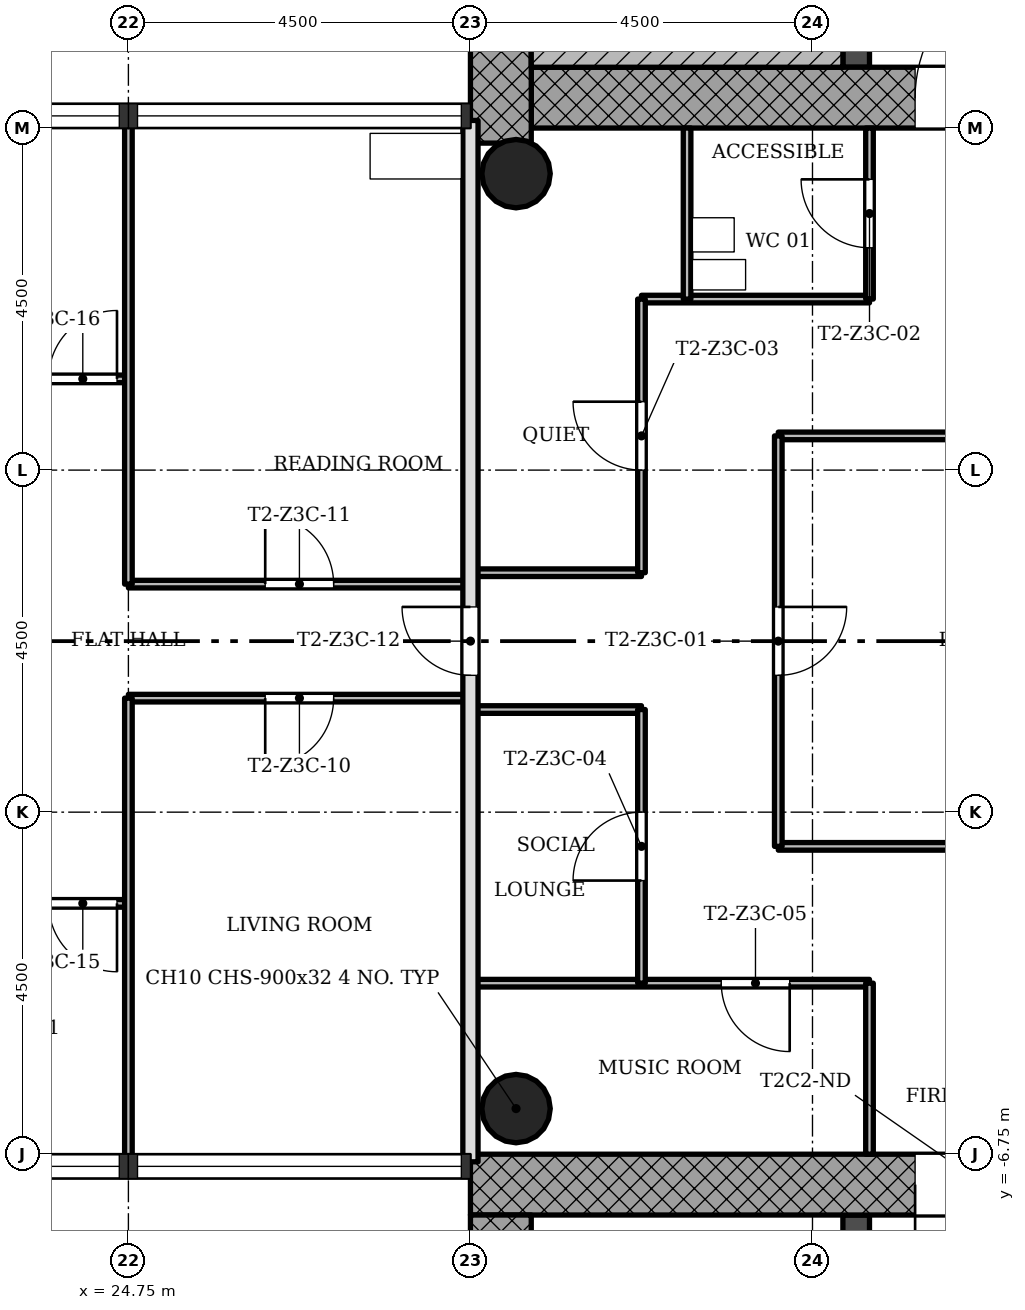
"""IFC4 building model, lengths in metres.
Left out: names, types, materials, properties, quantities, classifications, styles, units other than length and angle.
Written with IfcOpenShell. Run it as: python <this file> out.ifc"""

import sys

from ifc_helpers import new_model, si_unit, direction, frame, frame_2d, origin, origin_2d, place, context, subcontext, project, spatial, rectangle, hollow_circle, extrude, element, fill, save


model = new_model("IFC4")
c1 = context("Model", 3, precision=1e-05, world=origin(), true_north=direction((0.0, 1.0)))
c2 = subcontext(c1, "Body", "Model", "MODEL_VIEW")
j1 = project(units=[si_unit("LENGTHUNIT", "METRE"), si_unit("PLANEANGLEUNIT", "RADIAN")], contexts=[c1])
p1 = place(None, origin())
s1 = spatial("IfcSite", under=j1, at=p1, CompositionType="ELEMENT")
p2 = place(p1, origin())
s2 = spatial("IfcBuilding", under=s1, at=p2, CompositionType="ELEMENT")
p3 = place(p2, frame((0.0, 0.0, 160.9)))
s3 = spatial("IfcBuildingStorey", under=s2, at=p3, CompositionType="ELEMENT", Elevation=160.9)
p4 = place(p3, frame((30.05, 7.15, 0.0), z_axis=(0.0, 0.0, 1.0), x_axis=(1.0, 0.0, 0.0)))
e1 = element("IfcWall", 1, at=p4, inside=s3, PredefinedType="SHEAR", context=c2, shape_type="SweptSolid", body=[
    extrude(rectangle(XDim=12.7, YDim=0.8, at=frame_2d((6.35, 0.0))), origin(), (0.0, 0.0, 1.0), 3.4),
])
p5 = place(p4, frame((5.05, 0.0, 0.0)))
e2 = element("IfcOpeningElement", 2, at=p5, cuts=e1, PredefinedType="OPENING", context=c2, shape_type="SweptSolid", body=[
    extrude(rectangle(XDim=1.8, YDim=2.1, at=frame_2d((0.9, 1.05))), frame((0.0, 0.41, 0.0), z_axis=(0.0, -1.0, 0.0), x_axis=(1.0, 0.0, 0.0)), (0.0, 0.0, 1.0), 0.82),
])
p6 = place(p3, frame((29.65, 15.348, 0.0), z_axis=(0.0, 0.0, 1.0), x_axis=(0.0, -1.0, 0.0)))
e3 = element("IfcWall", 3, at=p6, inside=s3, PredefinedType="SHEAR", context=c2, shape_type="SweptSolid", body=[
    extrude(rectangle(XDim=8.796, YDim=0.8, at=frame_2d((4.398, 0.0))), origin(), (0.0, 0.0, 1.0), 3.4),
])
p7 = place(p3, frame((34.325, 7.55, 0.0), z_axis=(0.0, 0.0, 1.0), x_axis=(0.0, 1.0, 0.0)))
e4 = element("IfcWall", 4, at=p7, inside=s3, PredefinedType="SHEAR", context=c2, shape_type="SweptSolid", body=[
    extrude(rectangle(XDim=7.4, YDim=0.35, at=frame_2d((3.7, 0.0))), origin(), (0.0, 0.0, 1.0), 3.4),
])
p8 = place(p7, frame((0.85, 0.0, 0.0)))
e5 = element("IfcOpeningElement", 5, at=p8, cuts=e4, PredefinedType="OPENING", context=c2, shape_type="SweptSolid", body=[
    extrude(rectangle(XDim=0.9, YDim=2.1, at=frame_2d((0.45, 1.05))), frame((0.0, 0.185, 0.0), z_axis=(0.0, -1.0, 0.0), x_axis=(1.0, 0.0, 0.0)), (0.0, 0.0, 1.0), 0.37),
])
p9 = place(p3, frame((41.95, -7.15, 0.0), z_axis=(0.0, 0.0, 1.0), x_axis=(-1.0, 0.0, 0.0)))
e6 = element("IfcWall", 6, at=p9, inside=s3, PredefinedType="SHEAR", context=c2, shape_type="SweptSolid", body=[
    extrude(rectangle(XDim=12.7, YDim=0.8, at=frame_2d((6.35, 0.0))), origin(), (0.0, 0.0, 1.0), 3.4),
])
p10 = place(p9, frame((5.05, 0.0, 0.0)))
e7 = element("IfcOpeningElement", 7, at=p10, cuts=e6, PredefinedType="OPENING", context=c2, shape_type="SweptSolid", body=[
    extrude(rectangle(XDim=1.8, YDim=2.1, at=frame_2d((0.9, 1.05))), frame((0.0, 0.41, 0.0), z_axis=(0.0, -1.0, 0.0), x_axis=(1.0, 0.0, 0.0)), (0.0, 0.0, 1.0), 0.82),
])
p11 = place(p3, frame((29.65, -7.55, 0.0), z_axis=(0.0, 0.0, 1.0), x_axis=(0.0, -1.0, 0.0)))
e8 = element("IfcWall", 8, at=p11, inside=s3, PredefinedType="SHEAR", context=c2, shape_type="SweptSolid", body=[
    extrude(rectangle(XDim=8.2, YDim=0.8, at=frame_2d((4.1, 0.0))), origin(), (0.0, 0.0, 1.0), 3.4),
])
p12 = place(p3, frame((34.325, -14.95, 0.0), z_axis=(0.0, 0.0, 1.0), x_axis=(0.0, 1.0, 0.0)))
e9 = element("IfcWall", 9, at=p12, inside=s3, PredefinedType="SHEAR", context=c2, shape_type="SweptSolid", body=[
    extrude(rectangle(XDim=7.4, YDim=0.35, at=frame_2d((3.7, 0.0))), origin(), (0.0, 0.0, 1.0), 3.4),
])
p13 = place(p12, frame((5.35, 0.0, 0.0)))
e10 = element("IfcOpeningElement", 10, at=p13, cuts=e9, PredefinedType="OPENING", context=c2, shape_type="SweptSolid", body=[
    extrude(rectangle(XDim=1.1, YDim=2.1, at=frame_2d((0.55, 1.05))), frame((0.0, 0.185, 0.0), z_axis=(0.0, -1.0, 0.0), x_axis=(1.0, 0.0, 0.0)), (0.0, 0.0, 1.0), 0.37),
])
p14 = place(p12, frame((1.0, 0.0, 0.0)))
e11 = element("IfcOpeningElement", 11, at=p14, cuts=e9, PredefinedType="OPENING", context=c2, shape_type="SweptSolid", body=[
    extrude(rectangle(XDim=1.1, YDim=2.1, at=frame_2d((0.55, 1.05))), frame((0.0, 0.185, 0.0), z_axis=(0.0, -1.0, 0.0), x_axis=(1.0, 0.0, 0.0)), (0.0, 0.0, 1.0), 0.37),
])
p15 = place(p12, frame((3.3, 0.0, 0.0)))
e12 = element("IfcOpeningElement", 12, at=p15, cuts=e9, PredefinedType="OPENING", context=c2, shape_type="SweptSolid", body=[
    extrude(rectangle(XDim=0.9, YDim=2.1, at=frame_2d((0.45, 1.05))), frame((0.0, 0.185, 0.0), z_axis=(0.0, -1.0, 0.0), x_axis=(1.0, 0.0, 0.0)), (0.0, 0.0, 1.0), 0.37),
])
for number, where, z_axis, x_axis in (
    (13, (29.85, 6.15, 0.0), (0.0, 0.0, 1.0), (1.0, 0.0, 0.0)),
    (14, (29.85, -6.15, 0.0), (0.0, 0.0, 1.0), (1.0, 0.0, 0.0)),
):
    element("IfcColumn", number, at=place(p3, frame(where, z_axis=z_axis, x_axis=x_axis)), inside=s3, PredefinedType="COLUMN", context=c2, shape_type="SweptSolid", body=[
        extrude(hollow_circle(Radius=0.45, WallThickness=0.032, at=origin_2d()), origin(), (0.0, 0.0, 1.0), 3.4),
    ])
p16 = place(p3, frame((34.5, -4.5, 0.0), z_axis=(0.0, 0.0, 1.0), x_axis=(-1.0, 0.0, 0.0)))
e15 = element("IfcWall", 15, at=p16, inside=s3, PredefinedType="PARTITIONING", context=c2, shape_type="SweptSolid", body=[
    extrude(rectangle(XDim=5.25, YDim=0.1, at=frame_2d((2.625, 0.0))), origin(), (0.0, 0.0, 1.0), 3.0),
])
p17 = place(p16, frame((1.05, 0.0, 0.0)))
e16 = element("IfcOpeningElement", 16, at=p17, cuts=e15, PredefinedType="OPENING", context=c2, shape_type="SweptSolid", body=[
    extrude(rectangle(XDim=0.9, YDim=2.1, at=frame_2d((0.45, 1.05))), frame((0.0, 0.06, 0.0), z_axis=(0.0, -1.0, 0.0), x_axis=(1.0, 0.0, 0.0)), (0.0, 0.0, 1.0), 0.12),
])
p18 = place(p3, frame((24.75, -3.45, 0.0), z_axis=(0.0, 0.0, 1.0), x_axis=(-1.0, 0.0, 0.0)))
e17 = element("IfcWall", 17, at=p18, inside=s3, PredefinedType="PARTITIONING", context=c2, shape_type="SweptSolid", body=[
    extrude(rectangle(XDim=4.5, YDim=0.1, at=frame_2d((2.25, 0.0))), origin(), (0.0, 0.0, 1.0), 3.0),
])
p19 = place(p18, frame((0.15, 0.0, 0.0)))
e18 = element("IfcOpeningElement", 18, at=p19, cuts=e17, PredefinedType="OPENING", context=c2, shape_type="SweptSolid", body=[
    extrude(rectangle(XDim=0.9, YDim=2.1, at=frame_2d((0.45, 1.05))), frame((0.0, 0.06, 0.0), z_axis=(0.0, -1.0, 0.0), x_axis=(1.0, 0.0, 0.0)), (0.0, 0.0, 1.0), 0.12),
])
p20 = place(p3, frame((38.7, -2.7, 0.0), z_axis=(0.0, 0.0, 1.0), x_axis=(-1.0, 0.0, 0.0)))
e19 = element("IfcWall", 19, at=p20, inside=s3, PredefinedType="PARTITIONING", context=c2, shape_type="SweptSolid", body=[
    extrude(rectangle(XDim=5.4, YDim=0.1, at=frame_2d((2.7, 0.0))), origin(), (0.0, 0.0, 1.0), 3.0),
])
p21 = place(p3, frame((31.5, -0.9, 0.0), z_axis=(0.0, 0.0, 1.0), x_axis=(-1.0, 0.0, 0.0)))
e20 = element("IfcWall", 20, at=p21, inside=s3, PredefinedType="PARTITIONING", context=c2, shape_type="SweptSolid", body=[
    extrude(rectangle(XDim=2.25, YDim=0.1, at=frame_2d((1.125, 0.0))), origin(), (0.0, 0.0, 1.0), 3.0),
])
p22 = place(p3, frame((29.25, -0.75, 0.0), z_axis=(0.0, 0.0, 1.0), x_axis=(-1.0, 0.0, 0.0)))
e21 = element("IfcWall", 21, at=p22, inside=s3, PredefinedType="PARTITIONING", context=c2, shape_type="SweptSolid", body=[
    extrude(rectangle(XDim=4.5, YDim=0.1, at=frame_2d((2.25, 0.0))), origin(), (0.0, 0.0, 1.0), 3.0),
])
p23 = place(p22, frame((1.8, 0.0, 0.0)))
e22 = element("IfcOpeningElement", 22, at=p23, cuts=e21, PredefinedType="OPENING", context=c2, shape_type="SweptSolid", body=[
    extrude(rectangle(XDim=0.9, YDim=2.1, at=frame_2d((0.45, 1.05))), frame((0.0, 0.06, 0.0), z_axis=(0.0, -1.0, 0.0), x_axis=(1.0, 0.0, 0.0)), (0.0, 0.0, 1.0), 0.12),
])
p24 = place(p3, frame((29.25, 0.75, 0.0), z_axis=(0.0, 0.0, 1.0), x_axis=(-1.0, 0.0, 0.0)))
e23 = element("IfcWall", 23, at=p24, inside=s3, PredefinedType="PARTITIONING", context=c2, shape_type="SweptSolid", body=[
    extrude(rectangle(XDim=4.5, YDim=0.1, at=frame_2d((2.25, 0.0))), origin(), (0.0, 0.0, 1.0), 3.0),
])
p25 = place(p24, frame((1.8, 0.0, 0.0)))
e24 = element("IfcOpeningElement", 24, at=p25, cuts=e23, PredefinedType="OPENING", context=c2, shape_type="SweptSolid", body=[
    extrude(rectangle(XDim=0.9, YDim=2.1, at=frame_2d((0.45, 1.05))), frame((0.0, 0.06, 0.0), z_axis=(0.0, -1.0, 0.0), x_axis=(1.0, 0.0, 0.0)), (0.0, 0.0, 1.0), 0.12),
])
p26 = place(p3, frame((31.5, 0.9, 0.0), z_axis=(0.0, 0.0, 1.0), x_axis=(-1.0, 0.0, 0.0)))
e25 = element("IfcWall", 25, at=p26, inside=s3, PredefinedType="PARTITIONING", context=c2, shape_type="SweptSolid", body=[
    extrude(rectangle(XDim=2.25, YDim=0.1, at=frame_2d((1.125, 0.0))), origin(), (0.0, 0.0, 1.0), 3.0),
])
p27 = place(p3, frame((38.7, 2.7, 0.0), z_axis=(0.0, 0.0, 1.0), x_axis=(-1.0, 0.0, 0.0)))
e26 = element("IfcWall", 26, at=p27, inside=s3, PredefinedType="PARTITIONING", context=c2, shape_type="SweptSolid", body=[
    extrude(rectangle(XDim=5.4, YDim=0.1, at=frame_2d((2.7, 0.0))), origin(), (0.0, 0.0, 1.0), 3.0),
])
p28 = place(p3, frame((24.75, 3.45, 0.0), z_axis=(0.0, 0.0, 1.0), x_axis=(-1.0, 0.0, 0.0)))
e27 = element("IfcWall", 27, at=p28, inside=s3, PredefinedType="PARTITIONING", context=c2, shape_type="SweptSolid", body=[
    extrude(rectangle(XDim=4.5, YDim=0.1, at=frame_2d((2.25, 0.0))), origin(), (0.0, 0.0, 1.0), 3.0),
])
p29 = place(p28, frame((0.15, 0.0, 0.0)))
e28 = element("IfcOpeningElement", 28, at=p29, cuts=e27, PredefinedType="OPENING", context=c2, shape_type="SweptSolid", body=[
    extrude(rectangle(XDim=0.9, YDim=2.1, at=frame_2d((0.45, 1.05))), frame((0.0, 0.06, 0.0), z_axis=(0.0, -1.0, 0.0), x_axis=(1.0, 0.0, 0.0)), (0.0, 0.0, 1.0), 0.12),
])
p30 = place(p3, frame((34.5, 4.5, 0.0), z_axis=(0.0, 0.0, 1.0), x_axis=(-1.0, 0.0, 0.0)))
e29 = element("IfcWall", 29, at=p30, inside=s3, PredefinedType="PARTITIONING", context=c2, shape_type="SweptSolid", body=[
    extrude(rectangle(XDim=3.0, YDim=0.1, at=frame_2d((1.5, 0.0))), origin(), (0.0, 0.0, 1.0), 3.0),
])
p31 = place(p3, frame((34.5, -6.75, 0.0), z_axis=(0.0, 0.0, 1.0), x_axis=(0.0, 1.0, 0.0)))
e30 = element("IfcWall", 30, at=p31, inside=s3, PredefinedType="PARTITIONING", context=c2, shape_type="SweptSolid", body=[
    extrude(rectangle(XDim=2.25, YDim=0.1, at=frame_2d((1.125, 0.0))), origin(), (0.0, 0.0, 1.0), 3.0),
])
p32 = place(p3, frame((34.5, 4.5, 0.0), z_axis=(0.0, 0.0, 1.0), x_axis=(0.0, 1.0, 0.0)))
e31 = element("IfcWall", 31, at=p32, inside=s3, PredefinedType="PARTITIONING", context=c2, shape_type="SweptSolid", body=[
    extrude(rectangle(XDim=2.25, YDim=0.1, at=frame_2d((1.125, 0.0))), origin(), (0.0, 0.0, 1.0), 3.0),
])
p33 = place(p32, frame((0.675, 0.0, 0.0)))
e32 = element("IfcOpeningElement", 32, at=p33, cuts=e31, PredefinedType="OPENING", context=c2, shape_type="SweptSolid", body=[
    extrude(rectangle(XDim=0.9, YDim=2.1, at=frame_2d((0.45, 1.05))), frame((0.0, 0.06, 0.0), z_axis=(0.0, -1.0, 0.0), x_axis=(1.0, 0.0, 0.0)), (0.0, 0.0, 1.0), 0.12),
])
p34 = place(p3, frame((33.3, -2.7, 0.0), z_axis=(0.0, 0.0, 1.0), x_axis=(0.0, 1.0, 0.0)))
e33 = element("IfcWall", 33, at=p34, inside=s3, PredefinedType="PARTITIONING", context=c2, shape_type="SweptSolid", body=[
    extrude(rectangle(XDim=5.4, YDim=0.1, at=frame_2d((2.7, 0.0))), origin(), (0.0, 0.0, 1.0), 3.0),
])
p35 = place(p34, frame((2.25, 0.0, 0.0)))
e34 = element("IfcOpeningElement", 34, at=p35, cuts=e33, PredefinedType="OPENING", context=c2, shape_type="SweptSolid", body=[
    extrude(rectangle(XDim=0.9, YDim=2.1, at=frame_2d((0.45, 1.05))), frame((0.0, 0.06, 0.0), z_axis=(0.0, -1.0, 0.0), x_axis=(1.0, 0.0, 0.0)), (0.0, 0.0, 1.0), 0.12),
])
p36 = place(p3, frame((32.1, 4.5, 0.0), z_axis=(0.0, 0.0, 1.0), x_axis=(0.0, 1.0, 0.0)))
e35 = element("IfcWall", 35, at=p36, inside=s3, PredefinedType="PARTITIONING", context=c2, shape_type="SweptSolid", body=[
    extrude(rectangle(XDim=2.25, YDim=0.1, at=frame_2d((1.125, 0.0))), origin(), (0.0, 0.0, 1.0), 3.0),
])
p37 = place(p3, frame((31.5, -4.5, 0.0), z_axis=(0.0, 0.0, 1.0), x_axis=(0.0, 1.0, 0.0)))
e36 = element("IfcWall", 36, at=p37, inside=s3, PredefinedType="PARTITIONING", context=c2, shape_type="SweptSolid", body=[
    extrude(rectangle(XDim=3.6, YDim=0.1, at=frame_2d((1.8, 0.0))), origin(), (0.0, 0.0, 1.0), 3.0),
])
p38 = place(p37, frame((1.35, 0.0, 0.0)))
e37 = element("IfcOpeningElement", 37, at=p38, cuts=e36, PredefinedType="OPENING", context=c2, shape_type="SweptSolid", body=[
    extrude(rectangle(XDim=0.9, YDim=2.1, at=frame_2d((0.45, 1.05))), frame((0.0, 0.06, 0.0), z_axis=(0.0, -1.0, 0.0), x_axis=(1.0, 0.0, 0.0)), (0.0, 0.0, 1.0), 0.12),
])
p39 = place(p3, frame((31.5, 0.9, 0.0), z_axis=(0.0, 0.0, 1.0), x_axis=(0.0, 1.0, 0.0)))
e38 = element("IfcWall", 38, at=p39, inside=s3, PredefinedType="PARTITIONING", context=c2, shape_type="SweptSolid", body=[
    extrude(rectangle(XDim=3.6, YDim=0.1, at=frame_2d((1.8, 0.0))), origin(), (0.0, 0.0, 1.0), 3.0),
])
p40 = place(p39, frame((1.35, 0.0, 0.0)))
e39 = element("IfcOpeningElement", 39, at=p40, cuts=e38, PredefinedType="OPENING", context=c2, shape_type="SweptSolid", body=[
    extrude(rectangle(XDim=0.9, YDim=2.1, at=frame_2d((0.45, 1.05))), frame((0.0, 0.06, 0.0), z_axis=(0.0, -1.0, 0.0), x_axis=(1.0, 0.0, 0.0)), (0.0, 0.0, 1.0), 0.12),
])
p41 = place(p3, frame((29.25, -6.85, 0.0), z_axis=(0.0, 0.0, 1.0), x_axis=(0.0, 1.0, 0.0)))
e40 = element("IfcWall", 40, at=p41, inside=s3, PredefinedType="SOLIDWALL", context=c2, shape_type="SweptSolid", body=[
    extrude(rectangle(XDim=13.7, YDim=0.2, at=frame_2d((6.85, 0.0))), origin(), (0.0, 0.0, 1.0), 3.0),
])
p42 = place(p41, frame((6.4, 0.0, 0.0)))
e41 = element("IfcOpeningElement", 41, at=p42, cuts=e40, PredefinedType="OPENING", context=c2, shape_type="SweptSolid", body=[
    extrude(rectangle(XDim=0.9, YDim=2.1, at=frame_2d((0.45, 1.05))), frame((0.0, 0.11, 0.0), z_axis=(0.0, -1.0, 0.0), x_axis=(1.0, 0.0, 0.0)), (0.0, 0.0, 1.0), 0.22),
])
for number, where, z_axis, x_axis in (
    (42, (24.75, -6.85, 0.0), (0.0, 0.0, 1.0), (0.0, 1.0, 0.0)),
    (43, (24.75, 0.75, 0.0), (0.0, 0.0, 1.0), (0.0, 1.0, 0.0)),
):
    element("IfcWall", number, at=place(p3, frame(where, z_axis=z_axis, x_axis=x_axis)), inside=s3, PredefinedType="PARTITIONING", context=c2, shape_type="SweptSolid", body=[
        extrude(rectangle(XDim=6.1, YDim=0.1, at=frame_2d((3.05, 0.0))), origin(), (0.0, 0.0, 1.0), 3.0),
    ])
p43 = place(p3, frame((34.15, 7.75, 0.0), z_axis=(0.0, 0.0, 1.0), x_axis=(-1.0, 0.0, 0.0)))
e44 = element("IfcWall", 44, at=p43, inside=s3, PredefinedType="SHEAR", context=c2, shape_type="SweptSolid", body=[
    extrude(rectangle(XDim=4.1, YDim=0.4, at=frame_2d((2.05, 0.0))), origin(), (0.0, 0.0, 1.0), 3.4),
])
p44 = place(p35, origin())
e45 = element("IfcDoor", 45, at=p44, inside=s3, OperationType="SINGLE_SWING_RIGHT", PredefinedType="DOOR", context=c2, shape_type="SweptSolid", body=[
    extrude(rectangle(XDim=0.9, YDim=2.1, at=frame_2d((0.45, 1.05))), frame((0.0, 0.025, 0.0), z_axis=(0.0, -1.0, 0.0), x_axis=(1.0, 0.0, 0.0)), (0.0, 0.0, 1.0), 0.05),
])
fill(e34, e45)
p45 = place(p33, origin())
e46 = element("IfcDoor", 46, at=p45, inside=s3, OperationType="SINGLE_SWING_LEFT", PredefinedType="DOOR", context=c2, shape_type="SweptSolid", body=[
    extrude(rectangle(XDim=0.9, YDim=2.1, at=frame_2d((0.45, 1.05))), frame((0.0, 0.025, 0.0), z_axis=(0.0, -1.0, 0.0), x_axis=(1.0, 0.0, 0.0)), (0.0, 0.0, 1.0), 0.05),
])
fill(e32, e46)
p46 = place(p40, origin())
e47 = element("IfcDoor", 47, at=p46, inside=s3, OperationType="SINGLE_SWING_LEFT", PredefinedType="DOOR", context=c2, shape_type="SweptSolid", body=[
    extrude(rectangle(XDim=0.9, YDim=2.1, at=frame_2d((0.45, 1.05))), frame((0.0, 0.025, 0.0), z_axis=(0.0, -1.0, 0.0), x_axis=(1.0, 0.0, 0.0)), (0.0, 0.0, 1.0), 0.05),
])
fill(e39, e47)
p47 = place(p38, origin())
e48 = element("IfcDoor", 48, at=p47, inside=s3, OperationType="SINGLE_SWING_RIGHT", PredefinedType="DOOR", context=c2, shape_type="SweptSolid", body=[
    extrude(rectangle(XDim=0.9, YDim=2.1, at=frame_2d((0.45, 1.05))), frame((0.0, 0.025, 0.0), z_axis=(0.0, -1.0, 0.0), x_axis=(1.0, 0.0, 0.0)), (0.0, 0.0, 1.0), 0.05),
])
fill(e37, e48)
p48 = place(p17, origin())
e49 = element("IfcDoor", 49, at=p48, inside=s3, OperationType="SINGLE_SWING_RIGHT", PredefinedType="DOOR", context=c2, shape_type="SweptSolid", body=[
    extrude(rectangle(XDim=0.9, YDim=2.1, at=frame_2d((0.45, 1.05))), frame((0.0, 0.025, 0.0), z_axis=(0.0, -1.0, 0.0), x_axis=(1.0, 0.0, 0.0)), (0.0, 0.0, 1.0), 0.05),
])
fill(e16, e49)
p49 = place(p23, origin())
e50 = element("IfcDoor", 50, at=p49, inside=s3, OperationType="SINGLE_SWING_LEFT", PredefinedType="DOOR", context=c2, shape_type="SweptSolid", body=[
    extrude(rectangle(XDim=0.9, YDim=2.1, at=frame_2d((0.45, 1.05))), frame((0.0, 0.025, 0.0), z_axis=(0.0, -1.0, 0.0), x_axis=(1.0, 0.0, 0.0)), (0.0, 0.0, 1.0), 0.05),
])
fill(e22, e50)
p50 = place(p25, origin())
e51 = element("IfcDoor", 51, at=p50, inside=s3, OperationType="SINGLE_SWING_RIGHT", PredefinedType="DOOR", context=c2, shape_type="SweptSolid", body=[
    extrude(rectangle(XDim=0.9, YDim=2.1, at=frame_2d((0.45, 1.05))), frame((0.0, 0.025, 0.0), z_axis=(0.0, -1.0, 0.0), x_axis=(1.0, 0.0, 0.0)), (0.0, 0.0, 1.0), 0.05),
])
fill(e24, e51)
p51 = place(p42, origin())
e52 = element("IfcDoor", 52, at=p51, inside=s3, OperationType="SINGLE_SWING_LEFT", PredefinedType="DOOR", context=c2, shape_type="SweptSolid", body=[
    extrude(rectangle(XDim=0.9, YDim=2.1, at=frame_2d((0.45, 1.05))), frame((0.0, 0.025, 0.0), z_axis=(0.0, -1.0, 0.0), x_axis=(1.0, 0.0, 0.0)), (0.0, 0.0, 1.0), 0.05),
])
fill(e41, e52)
p52 = place(p19, origin())
e53 = element("IfcDoor", 53, at=p52, inside=s3, OperationType="SINGLE_SWING_RIGHT", PredefinedType="DOOR", context=c2, shape_type="SweptSolid", body=[
    extrude(rectangle(XDim=0.9, YDim=2.1, at=frame_2d((0.45, 1.05))), frame((0.0, 0.025, 0.0), z_axis=(0.0, -1.0, 0.0), x_axis=(1.0, 0.0, 0.0)), (0.0, 0.0, 1.0), 0.05),
])
fill(e18, e53)
p53 = place(p29, origin())
e54 = element("IfcDoor", 54, at=p53, inside=s3, OperationType="SINGLE_SWING_LEFT", PredefinedType="DOOR", context=c2, shape_type="SweptSolid", body=[
    extrude(rectangle(XDim=0.9, YDim=2.1, at=frame_2d((0.45, 1.05))), frame((0.0, 0.025, 0.0), z_axis=(0.0, -1.0, 0.0), x_axis=(1.0, 0.0, 0.0)), (0.0, 0.0, 1.0), 0.05),
])
fill(e28, e54)
p54 = place(p5, origin())
e55 = element("IfcDoor", 55, at=p54, inside=s3, OperationType="SINGLE_SWING_LEFT", PredefinedType="DOOR", context=c2, shape_type="SweptSolid", body=[
    extrude(rectangle(XDim=1.8, YDim=2.1, at=frame_2d((0.9, 1.05))), frame((0.0, 0.025, 0.0), z_axis=(0.0, -1.0, 0.0), x_axis=(1.0, 0.0, 0.0)), (0.0, 0.0, 1.0), 0.05),
])
fill(e2, e55)
p55 = place(p10, origin())
e56 = element("IfcDoor", 56, at=p55, inside=s3, OperationType="SINGLE_SWING_LEFT", PredefinedType="DOOR", context=c2, shape_type="SweptSolid", body=[
    extrude(rectangle(XDim=1.8, YDim=2.1, at=frame_2d((0.9, 1.05))), frame((0.0, 0.025, 0.0), z_axis=(0.0, -1.0, 0.0), x_axis=(1.0, 0.0, 0.0)), (0.0, 0.0, 1.0), 0.05),
])
fill(e7, e56)
save(model, sys.argv[1])
